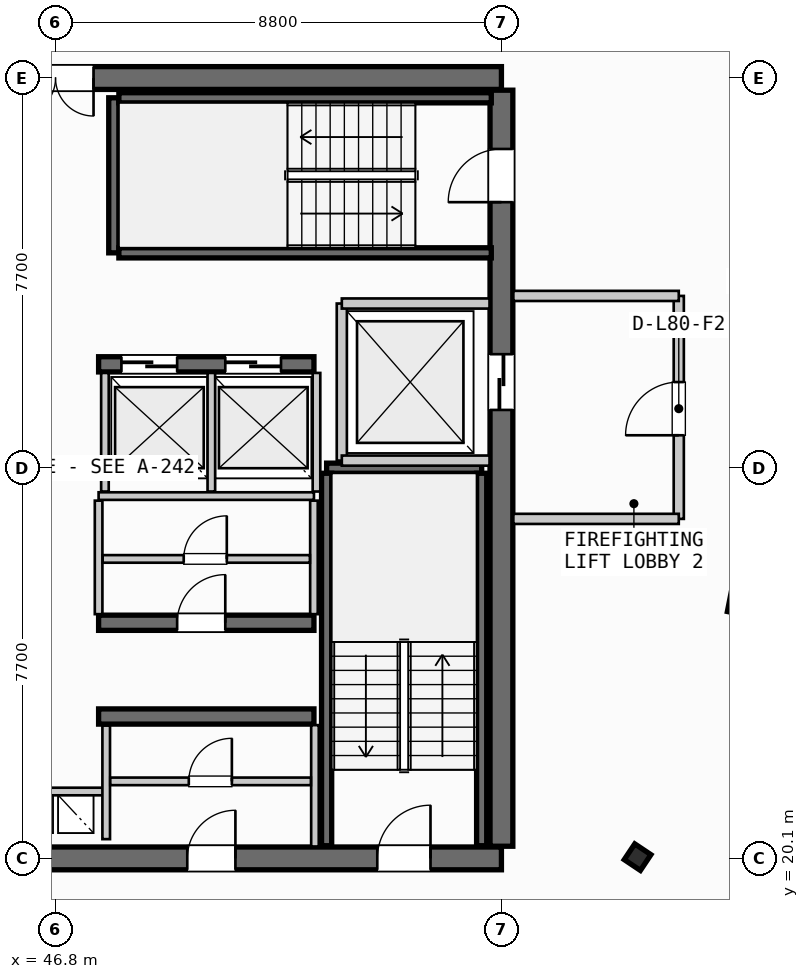
"""IFC4 building model, lengths in metres.
Left out: names, types, materials, properties, quantities, classifications, styles, units other than length and angle.
Written with IfcOpenShell. Run it as: python <this file> out.ifc"""

import sys

from ifc_helpers import new_model, si_unit, direction, frame, frame_2d, origin, origin_2d, place, context, subcontext, project, spatial, rectangle, i_section, extrude, source, transform, mapped, element, fill, save


model = new_model("IFC4")
c1 = context("Model", 3, precision=1e-05, world=origin(), true_north=direction((0.0, 1.0)))
c2 = subcontext(c1, "Body", "Model", "MODEL_VIEW")
j1 = project(units=[si_unit("LENGTHUNIT", "METRE"), si_unit("PLANEANGLEUNIT", "RADIAN")], contexts=[c1])
p1 = place(None, origin())
s1 = spatial("IfcSite", under=j1, at=p1, CompositionType="ELEMENT")
p2 = place(p1, origin())
s2 = spatial("IfcBuilding", under=s1, at=p2, CompositionType="ELEMENT")
p3 = place(p2, frame((0.0, 0.0, 300.85)))
s3 = spatial("IfcBuildingStorey", under=s2, at=p3, CompositionType="ELEMENT", Elevation=300.85)
p4 = place(p3, frame((38.0, 20.1, 0.0), z_axis=(0.0, 0.0, 1.0), x_axis=(1.0, 0.0, 0.0)))
e1 = element("IfcWall", 1, at=p4, inside=s3, PredefinedType="SHEAR", context=c2, shape_type="SweptSolid", body=[
    extrude(rectangle(XDim=17.6, YDim=0.45, at=frame_2d((8.8, 0.0))), origin(), (0.0, 0.0, 1.0), 3.185),
])
p5 = place(p4, frame((1.4, 0.0, 0.0)))
e2 = element("IfcOpeningElement", 2, at=p5, cuts=e1, PredefinedType="OPENING", context=c2, shape_type="SweptSolid", body=[
    extrude(rectangle(XDim=1.05, YDim=2.15, at=frame_2d((0.525, 1.075))), frame((0.0, 0.235, 0.0), z_axis=(0.0, -1.0, 0.0), x_axis=(1.0, 0.0, 0.0)), (0.0, 0.0, 1.0), 0.47),
])
p6 = place(p4, frame((15.15, 0.0, 0.0)))
e3 = element("IfcOpeningElement", 3, at=p6, cuts=e1, PredefinedType="OPENING", context=c2, shape_type="SweptSolid", body=[
    extrude(rectangle(XDim=1.05, YDim=2.15, at=frame_2d((0.525, 1.075))), frame((0.0, 0.235, 0.0), z_axis=(0.0, -1.0, 0.0), x_axis=(1.0, 0.0, 0.0)), (0.0, 0.0, 1.0), 0.47),
])
p7 = place(p4, frame((5.25, 0.0, 0.0)))
e4 = element("IfcOpeningElement", 4, at=p7, cuts=e1, PredefinedType="OPENING", context=c2, shape_type="SweptSolid", body=[
    extrude(rectangle(XDim=0.9, YDim=2.15, at=frame_2d((0.45, 1.075))), frame((0.0, 0.235, 0.0), z_axis=(0.0, -1.0, 0.0), x_axis=(1.0, 0.0, 0.0)), (0.0, 0.0, 1.0), 0.47),
])
p8 = place(p4, frame((11.4, 0.0, 0.0)))
e5 = element("IfcOpeningElement", 5, at=p8, cuts=e1, PredefinedType="OPENING", context=c2, shape_type="SweptSolid", body=[
    extrude(rectangle(XDim=0.95, YDim=2.15, at=frame_2d((0.475, 1.075))), frame((0.0, 0.235, 0.0), z_axis=(0.0, -1.0, 0.0), x_axis=(1.0, 0.0, 0.0)), (0.0, 0.0, 1.0), 0.47),
])
p9 = place(p3, frame((55.6, 35.5, 0.0), z_axis=(0.0, 0.0, 1.0), x_axis=(-1.0, 0.0, 0.0)))
e6 = element("IfcWall", 6, at=p9, inside=s3, PredefinedType="SHEAR", context=c2, shape_type="SweptSolid", body=[
    extrude(rectangle(XDim=17.6, YDim=0.45, at=frame_2d((8.8, 0.0))), origin(), (0.0, 0.0, 1.0), 3.185),
])
p10 = place(p9, frame((8.05, 0.0, 0.0)))
e7 = element("IfcOpeningElement", 7, at=p10, cuts=e6, PredefinedType="OPENING", context=c2, shape_type="SweptSolid", body=[
    extrude(rectangle(XDim=1.5, YDim=2.2, at=frame_2d((0.75, 1.1))), frame((0.0, 0.235, 0.0), z_axis=(0.0, -1.0, 0.0), x_axis=(1.0, 0.0, 0.0)), (0.0, 0.0, 1.0), 0.47),
])
p11 = place(p9, frame((15.1, 0.0, 0.0)))
e8 = element("IfcOpeningElement", 8, at=p11, cuts=e6, PredefinedType="OPENING", context=c2, shape_type="SweptSolid", body=[
    extrude(rectangle(XDim=0.95, YDim=2.15, at=frame_2d((0.475, 1.075))), frame((0.0, 0.235, 0.0), z_axis=(0.0, -1.0, 0.0), x_axis=(1.0, 0.0, 0.0)), (0.0, 0.0, 1.0), 0.47),
])
p12 = place(p9, frame((12.9, 0.0, 0.0)))
e9 = element("IfcOpeningElement", 9, at=p12, cuts=e6, PredefinedType="OPENING", context=c2, shape_type="SweptSolid", body=[
    extrude(rectangle(XDim=0.9, YDim=2.15, at=frame_2d((0.45, 1.075))), frame((0.0, 0.235, 0.0), z_axis=(0.0, -1.0, 0.0), x_axis=(1.0, 0.0, 0.0)), (0.0, 0.0, 1.0), 0.47),
])
p13 = place(p9, frame((10.6, 0.0, 0.0)))
e10 = element("IfcOpeningElement", 10, at=p13, cuts=e6, PredefinedType="OPENING", context=c2, shape_type="SweptSolid", body=[
    extrude(rectangle(XDim=0.95, YDim=2.15, at=frame_2d((0.475, 1.075))), frame((0.0, 0.235, 0.0), z_axis=(0.0, -1.0, 0.0), x_axis=(1.0, 0.0, 0.0)), (0.0, 0.0, 1.0), 0.47),
])
p14 = place(p3, frame((55.6, 20.34, 0.0), z_axis=(0.0, 0.0, 1.0), x_axis=(0.0, 1.0, 0.0)))
e11 = element("IfcWall", 11, at=p14, inside=s3, PredefinedType="SHEAR", context=c2, shape_type="SweptSolid", body=[
    extrude(rectangle(XDim=14.92, YDim=0.45, at=frame_2d((7.46, 0.0))), origin(), (0.0, 0.0, 1.0), 3.185),
])
p15 = place(p14, frame((12.71, 0.0, 0.0)))
e12 = element("IfcOpeningElement", 12, at=p15, cuts=e11, PredefinedType="OPENING", context=c2, shape_type="SweptSolid", body=[
    extrude(rectangle(XDim=1.05, YDim=2.15, at=frame_2d((0.525, 1.075))), frame((0.0, 0.235, 0.0), z_axis=(0.0, -1.0, 0.0), x_axis=(1.0, 0.0, 0.0)), (0.0, 0.0, 1.0), 0.47),
])
p16 = place(p14, frame((8.61, 0.0, 0.0)))
e13 = element("IfcOpeningElement", 13, at=p16, cuts=e11, PredefinedType="OPENING", context=c2, shape_type="SweptSolid", body=[
    extrude(rectangle(XDim=1.1, YDim=2.2, at=frame_2d((0.55, 1.1))), frame((0.0, 0.235, 0.0), z_axis=(0.0, -1.0, 0.0), x_axis=(1.0, 0.0, 0.0)), (0.0, 0.0, 1.0), 0.47),
])
p17 = place(p3, frame((47.65, 22.9, 0.0), z_axis=(0.0, 0.0, 1.0), x_axis=(1.0, 0.0, 0.0)))
e14 = element("IfcWall", 14, at=p17, inside=s3, PredefinedType="SHEAR", context=c2, shape_type="SweptSolid", body=[
    extrude(rectangle(XDim=4.25, YDim=0.3, at=frame_2d((2.125, 0.0))), origin(), (0.0, 0.0, 1.0), 3.185),
])
p18 = place(p3, frame((47.65, 24.75, 0.0), z_axis=(0.0, 0.0, 1.0), x_axis=(1.0, 0.0, 0.0)))
e15 = element("IfcWall", 15, at=p18, inside=s3, PredefinedType="SHEAR", context=c2, shape_type="SweptSolid", body=[
    extrude(rectangle(XDim=4.25, YDim=0.3, at=frame_2d((2.125, 0.0))), origin(), (0.0, 0.0, 1.0), 3.185),
])
p19 = place(p18, frame((1.55, 0.0, 0.0)))
e16 = element("IfcOpeningElement", 16, at=p19, cuts=e15, PredefinedType="OPENING", context=c2, shape_type="SweptSolid", body=[
    extrude(rectangle(XDim=0.95, YDim=2.15, at=frame_2d((0.475, 1.075))), frame((0.0, 0.16, 0.0), z_axis=(0.0, -1.0, 0.0), x_axis=(1.0, 0.0, 0.0)), (0.0, 0.0, 1.0), 0.32),
])
p20 = place(p3, frame((47.65, 29.85, 0.0), z_axis=(0.0, 0.0, 1.0), x_axis=(1.0, 0.0, 0.0)))
e17 = element("IfcWall", 17, at=p20, inside=s3, PredefinedType="SHEAR", context=c2, shape_type="SweptSolid", body=[
    extrude(rectangle(XDim=4.25, YDim=0.3, at=frame_2d((2.125, 0.0))), origin(), (0.0, 0.0, 1.0), 3.185),
])
p21 = place(p20, frame((0.45, 0.0, 0.0)))
e18 = element("IfcOpeningElement", 18, at=p21, cuts=e17, PredefinedType="OPENING", context=c2, shape_type="SweptSolid", body=[
    extrude(rectangle(XDim=1.1, YDim=2.2, at=frame_2d((0.55, 1.1))), frame((0.0, 0.16, 0.0), z_axis=(0.0, -1.0, 0.0), x_axis=(1.0, 0.0, 0.0)), (0.0, 0.0, 1.0), 0.32),
])
p22 = place(p20, frame((2.5, 0.0, 0.0)))
e19 = element("IfcOpeningElement", 19, at=p22, cuts=e17, PredefinedType="OPENING", context=c2, shape_type="SweptSolid", body=[
    extrude(rectangle(XDim=1.1, YDim=2.2, at=frame_2d((0.55, 1.1))), frame((0.0, 0.16, 0.0), z_axis=(0.0, -1.0, 0.0), x_axis=(1.0, 0.0, 0.0)), (0.0, 0.0, 1.0), 0.32),
])
m1 = source(origin(), c2, "Body", "SweptSolid", [
    extrude(i_section(OverallWidth=0.374, OverallDepth=0.383, WebThickness=0.017, FlangeThickness=0.026, FilletRadius=0.015, at=origin_2d()), origin(), (0.0, 0.0, 1.0), 3.185),
])
for number, where, z_axis, x_axis in (
    (20, (58.287, 20.125, 0.0), (0.0, 0.0, 1.0), (0.831, -0.556, 0.0)),
    (21, (60.284, 25.118, 0.0), (0.0, 0.0, 1.0), (0.981, -0.195, 0.0)),
):
    element("IfcColumn", number, at=place(p3, frame(where, z_axis=z_axis, x_axis=x_axis)), inside=s3, PredefinedType="COLUMN", context=c2, shape_type="MappedRepresentation", body=[
        mapped(m1, transform((0.0, 0.0, 0.0), scale=1.0)),
    ])
p23 = place(p3, frame((52.15, 27.8, 0.0), z_axis=(0.0, 0.0, 1.0), x_axis=(1.0, 0.0, 0.0)))
e22 = element("IfcWall", 22, at=p23, inside=s3, PredefinedType="SHEAR", context=c2, shape_type="SweptSolid", body=[
    extrude(rectangle(XDim=3.06, YDim=0.2, at=frame_2d((1.53, 0.0))), origin(), (0.0, 0.0, 1.0), 3.185),
])
for number, where, z_axis, x_axis in (
    (23, (55.21, 27.7, 0.0), (0.0, 0.0, 1.0), (0.0, -1.0, 0.0)),
    (24, (52.15, 20.35, 0.0), (0.0, 0.0, 1.0), (0.0, 1.0, 0.0)),
):
    element("IfcWall", number, at=place(p3, frame(where, z_axis=z_axis, x_axis=x_axis)), inside=s3, PredefinedType="SHEAR", context=c2, shape_type="SweptSolid", body=[
        extrude(rectangle(XDim=7.35, YDim=0.2, at=frame_2d((3.675, 0.0))), origin(), (0.0, 0.0, 1.0), 3.185),
    ])
p24 = place(p3, frame((47.95, 32.05, 0.0), z_axis=(0.0, 0.0, 1.0), x_axis=(0.0, 1.0, 0.0)))
e25 = element("IfcWall", 25, at=p24, inside=s3, PredefinedType="SHEAR", context=c2, shape_type="SweptSolid", body=[
    extrude(rectangle(XDim=3.06, YDim=0.2, at=frame_2d((1.53, 0.0))), origin(), (0.0, 0.0, 1.0), 3.185),
])
for number, where, z_axis, x_axis in (
    (26, (48.05, 35.11, 0.0), (0.0, 0.0, 1.0), (1.0, 0.0, 0.0)),
    (27, (55.4, 32.05, 0.0), (0.0, 0.0, 1.0), (-1.0, 0.0, 0.0)),
):
    element("IfcWall", number, at=place(p3, frame(where, z_axis=z_axis, x_axis=x_axis)), inside=s3, PredefinedType="SHEAR", context=c2, shape_type="SweptSolid", body=[
        extrude(rectangle(XDim=7.35, YDim=0.2, at=frame_2d((3.675, 0.0))), origin(), (0.0, 0.0, 1.0), 3.185),
    ])
p25 = place(p3, frame((45.8, 21.42, 0.0), z_axis=(0.0, 0.0, 1.0), x_axis=(1.0, 0.0, 0.0)))
e28 = element("IfcWall", 28, at=p25, inside=s3, PredefinedType="PARTITIONING", context=c2, shape_type="SweptSolid", body=[
    extrude(rectangle(XDim=2.0, YDim=0.15, at=frame_2d((1.0, 0.0))), origin(), (0.0, 0.0, 1.0), 2.28),
])
p26 = place(p3, frame((47.8, 20.48, 0.0), z_axis=(0.0, 0.0, 1.0), x_axis=(0.0, 1.0, 0.0)))
e29 = element("IfcWall", 29, at=p26, inside=s3, PredefinedType="PARTITIONING", context=c2, shape_type="SweptSolid", body=[
    extrude(rectangle(XDim=2.24, YDim=0.15, at=frame_2d((1.12, 0.0))), origin(), (0.0, 0.0, 1.0), 2.28),
])
p27 = place(p3, frame((52.45, 27.95, 0.0), z_axis=(0.0, 0.0, 1.0), x_axis=(0.0, 1.0, 0.0)))
e30 = element("IfcWall", 30, at=p27, inside=s3, PredefinedType="PARTITIONING", context=c2, shape_type="SweptSolid", body=[
    extrude(rectangle(XDim=3.1, YDim=0.2, at=frame_2d((1.55, 0.0))), origin(), (0.0, 0.0, 1.0), 2.28),
])
for number, where, z_axis, x_axis in (
    (31, (52.45, 27.95, 0.0), (0.0, 0.0, 1.0), (1.0, 0.0, 0.0)),
    (32, (52.45, 31.05, 0.0), (0.0, 0.0, 1.0), (1.0, 0.0, 0.0)),
):
    element("IfcWall", number, at=place(p3, frame(where, z_axis=z_axis, x_axis=x_axis)), inside=s3, PredefinedType="PARTITIONING", context=c2, shape_type="SweptSolid", body=[
        extrude(rectangle(XDim=2.915, YDim=0.2, at=frame_2d((1.458, 0.0))), origin(), (0.0, 0.0, 1.0), 2.28),
    ])
p28 = place(p3, frame((59.1, 26.8, 0.0), z_axis=(0.0, 0.0, 1.0), x_axis=(0.0, 1.0, 0.0)))
e33 = element("IfcWall", 33, at=p28, inside=s3, PredefinedType="PARTITIONING", context=c2, shape_type="SweptSolid", body=[
    extrude(rectangle(XDim=4.4, YDim=0.2, at=frame_2d((2.2, 0.0))), origin(), (0.0, 0.0, 1.0), 2.28),
])
p29 = place(p28, frame((1.65, 0.0, 0.0)))
e34 = element("IfcOpeningElement", 34, at=p29, cuts=e33, PredefinedType="OPENING", context=c2, shape_type="SweptSolid", body=[
    extrude(rectangle(XDim=1.05, YDim=2.15, at=frame_2d((0.525, 1.075))), frame((0.0, 0.11, 0.0), z_axis=(0.0, -1.0, 0.0), x_axis=(1.0, 0.0, 0.0)), (0.0, 0.0, 1.0), 0.22),
])
for number, where, z_axis, x_axis in (
    (35, (55.835, 26.8, 0.0), (0.0, 0.0, 1.0), (1.0, 0.0, 0.0)),
    (36, (55.835, 31.2, 0.0), (0.0, 0.0, 1.0), (1.0, 0.0, 0.0)),
):
    element("IfcWall", number, at=place(p3, frame(where, z_axis=z_axis, x_axis=x_axis)), inside=s3, PredefinedType="PARTITIONING", context=c2, shape_type="SweptSolid", body=[
        extrude(rectangle(XDim=3.265, YDim=0.2, at=frame_2d((1.633, 0.0))), origin(), (0.0, 0.0, 1.0), 2.28),
    ])
p30 = place(p3, frame((51.92, 20.335, 0.0), z_axis=(0.0, 0.0, 1.0), x_axis=(0.0, 1.0, 0.0)))
e37 = element("IfcWall", 37, at=p30, inside=s3, PredefinedType="PARTITIONING", context=c2, shape_type="SweptSolid", body=[
    extrude(rectangle(XDim=2.395, YDim=0.15, at=frame_2d((1.198, 0.0))), origin(), (0.0, 0.0, 1.0), 2.28),
])
p31 = place(p3, frame((47.88, 21.62, 0.0), z_axis=(0.0, 0.0, 1.0), x_axis=(1.0, 0.0, 0.0)))
e38 = element("IfcWall", 38, at=p31, inside=s3, PredefinedType="PARTITIONING", context=c2, shape_type="SweptSolid", body=[
    extrude(rectangle(XDim=3.96, YDim=0.15, at=frame_2d((1.98, 0.0))), origin(), (0.0, 0.0, 1.0), 2.28),
])
p32 = place(p31, frame((1.55, 0.0, 0.0)))
e39 = element("IfcOpeningElement", 39, at=p32, cuts=e38, PredefinedType="OPENING", context=c2, shape_type="SweptSolid", body=[
    extrude(rectangle(XDim=0.85, YDim=2.15, at=frame_2d((0.425, 1.075))), frame((0.0, 0.085, 0.0), z_axis=(0.0, -1.0, 0.0), x_axis=(1.0, 0.0, 0.0)), (0.0, 0.0, 1.0), 0.17),
])
p33 = place(p3, frame((47.65, 27.25, 0.0), z_axis=(0.0, 0.0, 1.0), x_axis=(1.0, 0.0, 0.0)))
e40 = element("IfcWall", 40, at=p33, inside=s3, PredefinedType="PARTITIONING", context=c2, shape_type="SweptSolid", body=[
    extrude(rectangle(XDim=4.25, YDim=0.15, at=frame_2d((2.125, 0.0))), origin(), (0.0, 0.0, 1.0), 2.28),
])
for number, where, z_axis, x_axis in (
    (41, (47.65, 24.92, 0.0), (0.0, 0.0, 1.0), (0.0, 1.0, 0.0)),
    (42, (51.9, 24.92, 0.0), (0.0, 0.0, 1.0), (0.0, 1.0, 0.0)),
):
    element("IfcWall", number, at=place(p3, frame(where, z_axis=z_axis, x_axis=x_axis)), inside=s3, PredefinedType="PARTITIONING", context=c2, shape_type="SweptSolid", body=[
        extrude(rectangle(XDim=2.24, YDim=0.15, at=frame_2d((1.12, 0.0))), origin(), (0.0, 0.0, 1.0), 2.28),
    ])
p34 = place(p3, frame((47.73, 26.01, 0.0), z_axis=(0.0, 0.0, 1.0), x_axis=(1.0, 0.0, 0.0)))
e43 = element("IfcWall", 43, at=p34, inside=s3, PredefinedType="PARTITIONING", context=c2, shape_type="SweptSolid", body=[
    extrude(rectangle(XDim=4.09, YDim=0.15, at=frame_2d((2.045, 0.0))), origin(), (0.0, 0.0, 1.0), 2.28),
])
p35 = place(p34, frame((1.6, 0.0, 0.0)))
e44 = element("IfcOpeningElement", 44, at=p35, cuts=e43, PredefinedType="OPENING", context=c2, shape_type="SweptSolid", body=[
    extrude(rectangle(XDim=0.85, YDim=2.15, at=frame_2d((0.425, 1.075))), frame((0.0, 0.085, 0.0), z_axis=(0.0, -1.0, 0.0), x_axis=(1.0, 0.0, 0.0)), (0.0, 0.0, 1.0), 0.17),
])
for number, where, z_axis, x_axis in (
    (45, (47.775, 27.34, 0.0), (0.0, 0.0, 1.0), (0.0, 1.0, 0.0)),
    (46, (49.875, 27.34, 0.0), (0.0, 0.0, 1.0), (0.0, 1.0, 0.0)),
    (47, (51.95, 27.34, 0.0), (0.0, 0.0, 1.0), (0.0, 1.0, 0.0)),
):
    element("IfcWall", number, at=place(p3, frame(where, z_axis=z_axis, x_axis=x_axis)), inside=s3, PredefinedType="PARTITIONING", context=c2, shape_type="SweptSolid", body=[
        extrude(rectangle(XDim=2.34, YDim=0.15, at=frame_2d((1.17, 0.0))), origin(), (0.0, 0.0, 1.0), 2.28),
    ])
m2 = source(origin(), c2, "Body", "SweptSolid", [
    extrude(rectangle(XDim=1.05, YDim=2.15, at=frame_2d((0.525, 1.075))), frame((0.0, 0.025, 0.0), z_axis=(0.0, -1.0, 0.0), x_axis=(1.0, 0.0, 0.0)), (0.0, 0.0, 1.0), 0.05),
])
p36 = place(p6, origin())
e48 = element("IfcDoor", 48, at=p36, inside=s3, OperationType="SINGLE_SWING_RIGHT", PredefinedType="DOOR", context=c2, shape_type="MappedRepresentation", body=[
    mapped(m2, transform((0.0, 0.0, 0.0), scale=1.0)),
])
fill(e3, e48)
p37 = place(p15, origin())
e49 = element("IfcDoor", 49, at=p37, inside=s3, OperationType="SINGLE_SWING_LEFT", PredefinedType="DOOR", context=c2, shape_type="MappedRepresentation", body=[
    mapped(m2, transform((0.0, 0.0, 0.0), scale=1.0)),
])
fill(e12, e49)
m3 = source(origin(), c2, "Body", "SweptSolid", [
    extrude(rectangle(XDim=1.5, YDim=2.2, at=frame_2d((0.75, 1.1))), frame((0.0, 0.025, 0.0), z_axis=(0.0, -1.0, 0.0), x_axis=(1.0, 0.0, 0.0)), (0.0, 0.0, 1.0), 0.05),
])
p38 = place(p10, origin())
e50 = element("IfcDoor", 50, at=p38, inside=s3, OperationType="DOUBLE_DOOR_SINGLE_SWING", PredefinedType="DOOR", context=c2, shape_type="MappedRepresentation", body=[
    mapped(m3, transform((0.0, 0.0, 0.0), scale=1.0)),
])
fill(e7, e50)
m4 = source(origin(), c2, "Body", "SweptSolid", [
    extrude(rectangle(XDim=1.1, YDim=2.2, at=frame_2d((0.55, 1.1))), frame((0.0, 0.025, 0.0), z_axis=(0.0, -1.0, 0.0), x_axis=(1.0, 0.0, 0.0)), (0.0, 0.0, 1.0), 0.05),
])
p39 = place(p16, origin())
e51 = element("IfcDoor", 51, at=p39, inside=s3, OperationType="SLIDING_TO_RIGHT", PredefinedType="DOOR", context=c2, shape_type="MappedRepresentation", body=[
    mapped(m4, transform((0.0, 0.0, 0.0), scale=1.0)),
])
fill(e13, e51)
m5 = source(origin(), c2, "Body", "SweptSolid", [
    extrude(rectangle(XDim=0.95, YDim=2.15, at=frame_2d((0.475, 1.075))), frame((0.0, 0.025, 0.0), z_axis=(0.0, -1.0, 0.0), x_axis=(1.0, 0.0, 0.0)), (0.0, 0.0, 1.0), 0.05),
])
p40 = place(p8, origin())
e52 = element("IfcDoor", 52, at=p40, inside=s3, OperationType="SINGLE_SWING_RIGHT", PredefinedType="DOOR", context=c2, shape_type="MappedRepresentation", body=[
    mapped(m5, transform((0.0, 0.0, 0.0), scale=1.0)),
])
fill(e5, e52)
p41 = place(p19, origin())
e53 = element("IfcDoor", 53, at=p41, inside=s3, OperationType="SINGLE_SWING_RIGHT", PredefinedType="DOOR", context=c2, shape_type="MappedRepresentation", body=[
    mapped(m5, transform((0.0, 0.0, 0.0), scale=1.0)),
])
fill(e16, e53)
p42 = place(p21, origin())
e54 = element("IfcDoor", 54, at=p42, inside=s3, OperationType="SLIDING_TO_LEFT", PredefinedType="DOOR", context=c2, shape_type="MappedRepresentation", body=[
    mapped(m4, transform((0.0, 0.0, 0.0), scale=1.0)),
])
fill(e18, e54)
p43 = place(p22, origin())
e55 = element("IfcDoor", 55, at=p43, inside=s3, OperationType="SLIDING_TO_LEFT", PredefinedType="DOOR", context=c2, shape_type="MappedRepresentation", body=[
    mapped(m4, transform((0.0, 0.0, 0.0), scale=1.0)),
])
fill(e19, e55)
p44 = place(p29, origin())
e56 = element("IfcDoor", 56, at=p44, inside=s3, OperationType="SINGLE_SWING_LEFT", PredefinedType="DOOR", context=c2, shape_type="MappedRepresentation", body=[
    mapped(m2, transform((0.0, 0.0, 0.0), scale=1.0)),
])
fill(e34, e56)
m6 = source(origin(), c2, "Body", "SweptSolid", [
    extrude(rectangle(XDim=0.85, YDim=2.15, at=frame_2d((0.425, 1.075))), frame((0.0, 0.025, 0.0), z_axis=(0.0, -1.0, 0.0), x_axis=(1.0, 0.0, 0.0)), (0.0, 0.0, 1.0), 0.05),
])
p45 = place(p32, origin())
e57 = element("IfcDoor", 57, at=p45, inside=s3, OperationType="SINGLE_SWING_RIGHT", PredefinedType="DOOR", context=c2, shape_type="MappedRepresentation", body=[
    mapped(m6, transform((0.0, 0.0, 0.0), scale=1.0)),
])
fill(e39, e57)
p46 = place(p35, origin())
e58 = element("IfcDoor", 58, at=p46, inside=s3, OperationType="SINGLE_SWING_RIGHT", PredefinedType="DOOR", context=c2, shape_type="MappedRepresentation", body=[
    mapped(m6, transform((0.0, 0.0, 0.0), scale=1.0)),
])
fill(e44, e58)
save(model, sys.argv[1])
